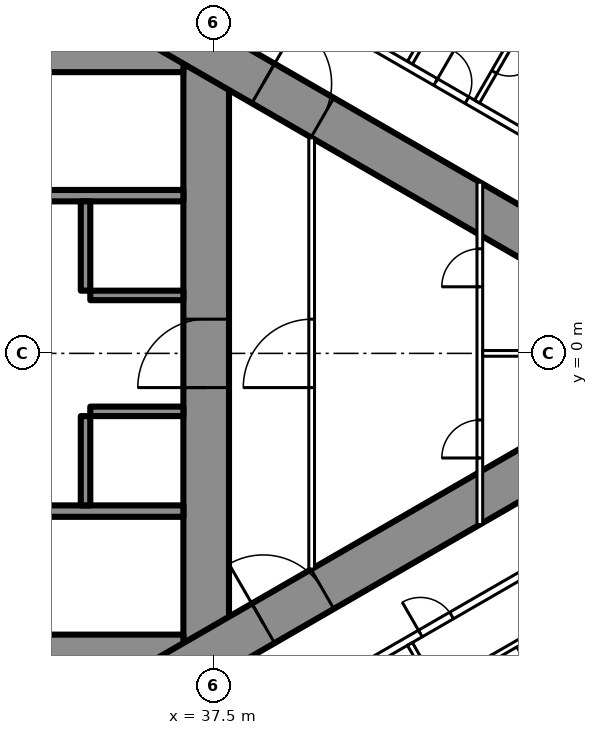
"""IFC4 building model, lengths in metres.
Left out: names, types, materials, properties, quantities, classifications, styles, units other than length and angle.
Written with IfcOpenShell. Run it as: python <this file> out.ifc"""

import sys

from ifc_helpers import new_model, si_unit, direction, frame, frame_2d, origin, place, context, subcontext, project, spatial, rectangle, extrude, element, fill, save


model = new_model("IFC4")
c1 = context("Model", 3, precision=1e-05, world=origin(), true_north=direction((0.0, 1.0)))
c2 = subcontext(c1, "Body", "Model", "MODEL_VIEW")
j1 = project(units=[si_unit("LENGTHUNIT", "METRE"), si_unit("PLANEANGLEUNIT", "RADIAN")], contexts=[c1])
p1 = place(None, origin())
s1 = spatial("IfcSite", under=j1, at=p1, CompositionType="ELEMENT")
p2 = place(p1, origin())
s2 = spatial("IfcBuilding", under=s1, at=p2, CompositionType="ELEMENT")
p3 = place(p2, frame((0.0, 0.0, 218.9)))
s3 = spatial("IfcBuildingStorey", under=s2, at=p3, CompositionType="ELEMENT", Elevation=218.9)
p4 = place(p3, frame((37.3, -8.6, 0.0), z_axis=(0.0, 0.0, 1.0), x_axis=(0.0, 1.0, 0.0)))
e1 = element("IfcWall", 1, at=p4, inside=s3, PredefinedType="SHEAR", context=c2, shape_type="SweptSolid", body=[
    extrude(rectangle(XDim=17.2, YDim=1.2, at=frame_2d((8.6, 0.0))), origin(), (0.0, 0.0, 1.0), 3.6),
])
p5 = place(p4, frame((7.7, 0.0, 0.0)))
e2 = element("IfcOpeningElement", 2, at=p5, cuts=e1, PredefinedType="OPENING", context=c2, shape_type="SweptSolid", body=[
    extrude(rectangle(XDim=1.8, YDim=2.2, at=frame_2d((0.9, 1.1))), frame((0.0, 0.61, 0.0), z_axis=(0.0, -1.0, 0.0), x_axis=(1.0, 0.0, 0.0)), (0.0, 0.0, 1.0), 1.22),
])
p6 = place(p3, frame((28.3, -8.0, 0.0), z_axis=(0.0, 0.0, 1.0), x_axis=(1.0, 0.0, 0.0)))
e3 = element("IfcWall", 3, at=p6, inside=s3, PredefinedType="SHEAR", context=c2, shape_type="SweptSolid", body=[
    extrude(rectangle(XDim=8.4, YDim=1.2, at=frame_2d((4.2, 0.0))), origin(), (0.0, 0.0, 1.0), 3.6),
])
p7 = place(p6, frame((0.25, 0.0, 0.0)))
e4 = element("IfcOpeningElement", 4, at=p7, cuts=e3, PredefinedType="OPENING", context=c2, shape_type="SweptSolid", body=[
    extrude(rectangle(XDim=1.0, YDim=2.2, at=frame_2d((0.5, 1.1))), frame((0.0, 0.61, 0.0), z_axis=(0.0, -1.0, 0.0), x_axis=(1.0, 0.0, 0.0)), (0.0, 0.0, 1.0), 1.22),
])
p8 = place(p3, frame((28.3, 8.0, 0.0), z_axis=(0.0, 0.0, 1.0), x_axis=(1.0, 0.0, 0.0)))
e5 = element("IfcWall", 5, at=p8, inside=s3, PredefinedType="SHEAR", context=c2, shape_type="SweptSolid", body=[
    extrude(rectangle(XDim=8.4, YDim=1.2, at=frame_2d((4.2, 0.0))), origin(), (0.0, 0.0, 1.0), 3.6),
])
p9 = place(p8, frame((0.25, 0.0, 0.0)))
e6 = element("IfcOpeningElement", 6, at=p9, cuts=e5, PredefinedType="OPENING", context=c2, shape_type="SweptSolid", body=[
    extrude(rectangle(XDim=1.0, YDim=2.2, at=frame_2d((0.5, 1.1))), frame((0.0, 0.61, 0.0), z_axis=(0.0, -1.0, 0.0), x_axis=(1.0, 0.0, 0.0)), (0.0, 0.0, 1.0), 1.22),
])
for number, where, z_axis, x_axis in (
    (7, (28.3, -4.15, 0.0), (0.0, 0.0, 1.0), (1.0, 0.0, 0.0)),
    (8, (28.3, 4.15, 0.0), (0.0, 0.0, 1.0), (1.0, 0.0, 0.0)),
):
    element("IfcWall", number, at=place(p3, frame(where, z_axis=z_axis, x_axis=x_axis)), inside=s3, PredefinedType="SHEAR", context=c2, shape_type="SweptSolid", body=[
        extrude(rectangle(XDim=8.4, YDim=0.3, at=frame_2d((4.2, 0.0))), origin(), (0.0, 0.0, 1.0), 3.6),
    ])
p10 = place(p3, frame((34.125, -4.0, 0.0), z_axis=(0.0, 0.0, 1.0), x_axis=(0.0, 1.0, 0.0)))
e9 = element("IfcWall", 9, at=p10, inside=s3, PredefinedType="SHEAR", context=c2, shape_type="SweptSolid", body=[
    extrude(rectangle(XDim=2.35, YDim=0.25, at=frame_2d((1.175, 0.0))), origin(), (0.0, 0.0, 1.0), 3.6),
])
p11 = place(p3, frame((34.25, -1.525, 0.0), z_axis=(0.0, 0.0, 1.0), x_axis=(1.0, 0.0, 0.0)))
e10 = element("IfcWall", 10, at=p11, inside=s3, PredefinedType="SHEAR", context=c2, shape_type="SweptSolid", body=[
    extrude(rectangle(XDim=2.45, YDim=0.25, at=frame_2d((1.225, 0.0))), origin(), (0.0, 0.0, 1.0), 3.6),
])
p12 = place(p3, frame((34.125, 1.65, 0.0), z_axis=(0.0, 0.0, 1.0), x_axis=(0.0, 1.0, 0.0)))
e11 = element("IfcWall", 11, at=p12, inside=s3, PredefinedType="SHEAR", context=c2, shape_type="SweptSolid", body=[
    extrude(rectangle(XDim=2.35, YDim=0.25, at=frame_2d((1.175, 0.0))), origin(), (0.0, 0.0, 1.0), 3.6),
])
p13 = place(p3, frame((34.25, 1.525, 0.0), z_axis=(0.0, 0.0, 1.0), x_axis=(1.0, 0.0, 0.0)))
e12 = element("IfcWall", 12, at=p13, inside=s3, PredefinedType="SHEAR", context=c2, shape_type="SweptSolid", body=[
    extrude(rectangle(XDim=2.45, YDim=0.25, at=frame_2d((1.225, 0.0))), origin(), (0.0, 0.0, 1.0), 3.6),
])
p14 = place(p3, frame((27.2, -13.8, 0.0), z_axis=(0.0, 0.0, 1.0), x_axis=(0.866027159892, 0.499996958321, 0.0)))
e13 = element("IfcWall", 13, at=p14, inside=s3, PredefinedType="SHEAR", context=c2, shape_type="SweptSolid", body=[
    extrude(rectangle(XDim=27.947, YDim=1.2, at=frame_2d((13.973, 0.0))), origin(), (0.0, 0.0, 1.0), 3.6),
])
p15 = place(p14, frame((4.6, 0.0, 0.0)))
e14 = element("IfcOpeningElement", 14, at=p15, cuts=e13, PredefinedType="OPENING", context=c2, shape_type="SweptSolid", body=[
    extrude(rectangle(XDim=1.0, YDim=2.2, at=frame_2d((0.5, 1.1))), frame((0.0, 0.61, 0.0), z_axis=(0.0, -1.0, 0.0), x_axis=(1.0, 0.0, 0.0)), (0.0, 0.0, 1.0), 1.22),
])
p16 = place(p14, frame((13.395, 0.0, 0.0)))
e15 = element("IfcOpeningElement", 15, at=p16, cuts=e13, PredefinedType="OPENING", context=c2, shape_type="SweptSolid", body=[
    extrude(rectangle(XDim=1.8, YDim=2.2, at=frame_2d((0.9, 1.1))), frame((0.0, 0.61, 0.0), z_axis=(0.0, -1.0, 0.0), x_axis=(1.0, 0.0, 0.0)), (0.0, 0.0, 1.0), 1.22),
])
p17 = place(p3, frame((27.2, 13.8, 0.0), z_axis=(0.0, 0.0, 1.0), x_axis=(0.866024515034, -0.500001539357, 0.0)))
e16 = element("IfcWall", 16, at=p17, inside=s3, PredefinedType="SHEAR", context=c2, shape_type="SweptSolid", body=[
    extrude(rectangle(XDim=26.907, YDim=1.2, at=frame_2d((13.454, 0.0))), origin(), (0.0, 0.0, 1.0), 3.6),
])
p18 = place(p17, frame((4.6, 0.0, 0.0)))
e17 = element("IfcOpeningElement", 17, at=p18, cuts=e16, PredefinedType="OPENING", context=c2, shape_type="SweptSolid", body=[
    extrude(rectangle(XDim=1.0, YDim=2.2, at=frame_2d((0.5, 1.1))), frame((0.0, 0.61, 0.0), z_axis=(0.0, -1.0, 0.0), x_axis=(1.0, 0.0, 0.0)), (0.0, 0.0, 1.0), 1.22),
])
p19 = place(p17, frame((13.395, 0.0, 0.0)))
e18 = element("IfcOpeningElement", 18, at=p19, cuts=e16, PredefinedType="OPENING", context=c2, shape_type="SweptSolid", body=[
    extrude(rectangle(XDim=1.8, YDim=2.2, at=frame_2d((0.9, 1.1))), frame((0.0, 0.61, 0.0), z_axis=(0.0, -1.0, 0.0), x_axis=(1.0, 0.0, 0.0)), (0.0, 0.0, 1.0), 1.22),
])
p20 = place(p3, frame((28.959, -15.44, 0.0), z_axis=(0.0, 0.0, 1.0), x_axis=(0.866025227435, 0.500000305447, 0.0)))
e19 = element("IfcWall", 19, at=p20, inside=s3, PredefinedType="PARTITIONING", context=c2, shape_type="SweptSolid", body=[
    extrude(rectangle(XDim=30.88, YDim=0.2, at=frame_2d((15.44, 0.0))), origin(), (0.0, 0.0, 1.0), 3.35),
])
p21 = place(p20, frame((1.494, 0.0, 0.0)))
e20 = element("IfcOpeningElement", 20, at=p21, cuts=e19, PredefinedType="OPENING", context=c2, shape_type="SweptSolid", body=[
    extrude(rectangle(XDim=1.8, YDim=2.03, at=frame_2d((0.9, 1.015))), frame((0.0, 0.11, 0.0), z_axis=(0.0, -1.0, 0.0), x_axis=(1.0, 0.0, 0.0)), (0.0, 0.0, 1.0), 0.22),
])
p22 = place(p20, frame((7.687, 0.0, 0.0)))
e21 = element("IfcOpeningElement", 21, at=p22, cuts=e19, PredefinedType="OPENING", context=c2, shape_type="SweptSolid", body=[
    extrude(rectangle(XDim=1.0, YDim=2.2, at=frame_2d((0.5, 1.1))), frame((0.0, 0.11, 0.0), z_axis=(0.0, -1.0, 0.0), x_axis=(1.0, 0.0, 0.0)), (0.0, 0.0, 1.0), 0.22),
])
p23 = place(p20, frame((16.137, 0.0, 0.0)))
e22 = element("IfcOpeningElement", 22, at=p23, cuts=e19, PredefinedType="OPENING", context=c2, shape_type="SweptSolid", body=[
    extrude(rectangle(XDim=0.95, YDim=2.2, at=frame_2d((0.475, 1.1))), frame((0.0, 0.11, 0.0), z_axis=(0.0, -1.0, 0.0), x_axis=(1.0, 0.0, 0.0)), (0.0, 0.0, 1.0), 0.22),
])
p24 = place(p20, frame((20.021, 0.0, 0.0)))
e23 = element("IfcOpeningElement", 23, at=p24, cuts=e19, PredefinedType="OPENING", context=c2, shape_type="SweptSolid", body=[
    extrude(rectangle(XDim=0.95, YDim=2.2, at=frame_2d((0.475, 1.1))), frame((0.0, 0.11, 0.0), z_axis=(0.0, -1.0, 0.0), x_axis=(1.0, 0.0, 0.0)), (0.0, 0.0, 1.0), 0.22),
])
p25 = place(p20, frame((26.253, 0.0, 0.0)))
e24 = element("IfcOpeningElement", 24, at=p25, cuts=e19, PredefinedType="OPENING", context=c2, shape_type="SweptSolid", body=[
    extrude(rectangle(XDim=0.95, YDim=2.2, at=frame_2d((0.475, 1.1))), frame((0.0, 0.11, 0.0), z_axis=(0.0, -1.0, 0.0), x_axis=(1.0, 0.0, 0.0)), (0.0, 0.0, 1.0), 0.22),
])
for number, where, z_axis, x_axis in (
    (25, (42.66, -7.646, 0.0), (0.0, 0.0, 1.0), (0.5, -0.866, 0.0)),
    (26, (42.66, 7.646, 0.0), (0.0, 0.0, 1.0), (0.5, 0.866, 0.0)),
):
    element("IfcWall", number, at=place(p3, frame(where, z_axis=z_axis, x_axis=x_axis)), inside=s3, PredefinedType="PARTITIONING", context=c2, shape_type="SweptSolid", body=[
        extrude(rectangle(XDim=6.398, YDim=0.15, at=frame_2d((3.199, 0.0))), origin(), (0.0, 0.0, 1.0), 2.45),
    ])
p26 = place(p3, frame((28.959, 15.44, 0.0), z_axis=(0.0, 0.0, 1.0), x_axis=(0.866028936079, -0.499993881836, 0.0)))
e27 = element("IfcWall", 27, at=p26, inside=s3, PredefinedType="PARTITIONING", context=c2, shape_type="SweptSolid", body=[
    extrude(rectangle(XDim=20.503, YDim=0.2, at=frame_2d((10.251, 0.0))), origin(), (0.0, 0.0, 1.0), 3.35),
])
p27 = place(p26, frame((16.603, 0.0, 0.0)))
e28 = element("IfcOpeningElement", 28, at=p27, cuts=e27, PredefinedType="OPENING", context=c2, shape_type="SweptSolid", body=[
    extrude(rectangle(XDim=0.95, YDim=2.2, at=frame_2d((0.475, 1.1))), frame((0.0, 0.11, 0.0), z_axis=(0.0, -1.0, 0.0), x_axis=(1.0, 0.0, 0.0)), (0.0, 0.0, 1.0), 0.22),
])
p28 = place(p26, frame((7.287, 0.0, 0.0)))
e29 = element("IfcOpeningElement", 29, at=p28, cuts=e27, PredefinedType="OPENING", context=c2, shape_type="SweptSolid", body=[
    extrude(rectangle(XDim=0.95, YDim=2.2, at=frame_2d((0.475, 1.1))), frame((0.0, 0.11, 0.0), z_axis=(0.0, -1.0, 0.0), x_axis=(1.0, 0.0, 0.0)), (0.0, 0.0, 1.0), 0.22),
])
p29 = place(p26, frame((2.244, 0.0, 0.0)))
e30 = element("IfcOpeningElement", 30, at=p29, cuts=e27, PredefinedType="OPENING", context=c2, shape_type="SweptSolid", body=[
    extrude(rectangle(XDim=1.8, YDim=2.03, at=frame_2d((0.9, 1.015))), frame((0.0, 0.11, 0.0), z_axis=(0.0, -1.0, 0.0), x_axis=(1.0, 0.0, 0.0)), (0.0, 0.0, 1.0), 0.22),
])
p30 = place(p3, frame((45.503, -7.621, 0.0), z_axis=(0.0, 0.0, 1.0), x_axis=(0.500006934395, -0.866021400173, 0.0)))
e31 = element("IfcWall", 31, at=p30, inside=s3, PredefinedType="PARTITIONING", context=c2, shape_type="SweptSolid", body=[
    extrude(rectangle(XDim=2.6, YDim=0.15, at=frame_2d((1.3, 0.0))), origin(), (0.0, 0.0, 1.0), 3.35),
])
p31 = place(p30, frame((0.9, 0.0, 0.0)))
e32 = element("IfcOpeningElement", 32, at=p31, cuts=e31, PredefinedType="OPENING", context=c2, shape_type="SweptSolid", body=[
    extrude(rectangle(XDim=0.8, YDim=2.2, at=frame_2d((0.4, 1.1))), frame((0.0, 0.085, 0.0), z_axis=(0.0, -1.0, 0.0), x_axis=(1.0, 0.0, 0.0)), (0.0, 0.0, 1.0), 0.17),
])
p32 = place(p3, frame((43.425, -8.821, 0.0), z_axis=(0.0, 0.0, 1.0), x_axis=(0.866006523861, 0.500032699561, 0.0)))
e33 = element("IfcWall", 33, at=p32, inside=s3, PredefinedType="PARTITIONING", context=c2, shape_type="SweptSolid", body=[
    extrude(rectangle(XDim=2.475, YDim=0.15, at=frame_2d((1.237, 0.0))), origin(), (0.0, 0.0, 1.0), 3.35),
])
p33 = place(p3, frame((44.427, 6.625, 0.0), z_axis=(0.0, 0.0, 1.0), x_axis=(0.500006934395, 0.866021400173, 0.0)))
e34 = element("IfcWall", 34, at=p33, inside=s3, PredefinedType="PARTITIONING", context=c2, shape_type="SweptSolid", body=[
    extrude(rectangle(XDim=2.6, YDim=0.15, at=frame_2d((1.3, 0.0))), origin(), (0.0, 0.0, 1.0), 3.35),
])
p34 = place(p33, frame((0.9, 0.0, 0.0)))
e35 = element("IfcOpeningElement", 35, at=p34, cuts=e34, PredefinedType="OPENING", context=c2, shape_type="SweptSolid", body=[
    extrude(rectangle(XDim=0.8, YDim=2.2, at=frame_2d((0.4, 1.1))), frame((0.0, 0.085, 0.0), z_axis=(0.0, -1.0, 0.0), x_axis=(1.0, 0.0, 0.0)), (0.0, 0.0, 1.0), 0.17),
])
p35 = place(p3, frame((40.075, -5.674, 0.0), z_axis=(0.0, 0.0, 1.0), x_axis=(0.0, 1.0, 0.0)))
e36 = element("IfcWall", 36, at=p35, inside=s3, PredefinedType="PARTITIONING", context=c2, shape_type="SweptSolid", body=[
    extrude(rectangle(XDim=11.348, YDim=0.15, at=frame_2d((5.674, 0.0))), origin(), (0.0, 0.0, 1.0), 3.35),
])
p36 = place(p35, frame((4.774, 0.0, 0.0)))
e37 = element("IfcOpeningElement", 37, at=p36, cuts=e36, PredefinedType="OPENING", context=c2, shape_type="SweptSolid", body=[
    extrude(rectangle(XDim=1.8, YDim=2.2, at=frame_2d((0.9, 1.1))), frame((0.0, 0.085, 0.0), z_axis=(0.0, -1.0, 0.0), x_axis=(1.0, 0.0, 0.0)), (0.0, 0.0, 1.0), 0.17),
])
p37 = place(p3, frame((44.5, -4.505, 0.0), z_axis=(0.0, 0.0, 1.0), x_axis=(0.0, 1.0, 0.0)))
e38 = element("IfcWall", 38, at=p37, inside=s3, PredefinedType="PARTITIONING", context=c2, shape_type="SweptSolid", body=[
    extrude(rectangle(XDim=9.009, YDim=0.15, at=frame_2d((4.505, 0.0))), origin(), (0.0, 0.0, 1.0), 3.35),
])
p38 = place(p37, frame((1.752, 0.0, 0.0)))
e39 = element("IfcOpeningElement", 39, at=p38, cuts=e38, PredefinedType="OPENING", context=c2, shape_type="SweptSolid", body=[
    extrude(rectangle(XDim=1.0, YDim=2.2, at=frame_2d((0.5, 1.1))), frame((0.0, 0.085, 0.0), z_axis=(0.0, -1.0, 0.0), x_axis=(1.0, 0.0, 0.0)), (0.0, 0.0, 1.0), 0.17),
])
p39 = place(p37, frame((6.257, 0.0, 0.0)))
e40 = element("IfcOpeningElement", 40, at=p39, cuts=e38, PredefinedType="OPENING", context=c2, shape_type="SweptSolid", body=[
    extrude(rectangle(XDim=1.0, YDim=2.2, at=frame_2d((0.5, 1.1))), frame((0.0, 0.085, 0.0), z_axis=(0.0, -1.0, 0.0), x_axis=(1.0, 0.0, 0.0)), (0.0, 0.0, 1.0), 0.17),
])
p40 = place(p3, frame((44.575, 0.0, 0.0), z_axis=(0.0, 0.0, 1.0), x_axis=(1.0, 0.0, 0.0)))
e41 = element("IfcWall", 41, at=p40, inside=s3, PredefinedType="PARTITIONING", context=c2, shape_type="SweptSolid", body=[
    extrude(rectangle(XDim=7.727, YDim=0.15, at=frame_2d((3.864, 0.0))), origin(), (0.0, 0.0, 1.0), 2.45),
])
p41 = place(p23, origin())
e42 = element("IfcDoor", 42, at=p41, inside=s3, OperationType="SINGLE_SWING_LEFT", PredefinedType="DOOR", context=c2, shape_type="SweptSolid", body=[
    extrude(rectangle(XDim=0.95, YDim=2.2, at=frame_2d((0.475, 1.1))), frame((0.0, 0.025, 0.0), z_axis=(0.0, -1.0, 0.0), x_axis=(1.0, 0.0, 0.0)), (0.0, 0.0, 1.0), 0.05),
])
fill(e22, e42)
p42 = place(p34, origin())
e43 = element("IfcDoor", 43, at=p42, inside=s3, OperationType="SINGLE_SWING_RIGHT", PredefinedType="DOOR", context=c2, shape_type="SweptSolid", body=[
    extrude(rectangle(XDim=0.8, YDim=2.2, at=frame_2d((0.4, 1.1))), frame((0.0, 0.025, 0.0), z_axis=(0.0, -1.0, 0.0), x_axis=(1.0, 0.0, 0.0)), (0.0, 0.0, 1.0), 0.05),
])
fill(e35, e43)
p43 = place(p27, origin())
e44 = element("IfcDoor", 44, at=p43, inside=s3, OperationType="SINGLE_SWING_LEFT", PredefinedType="DOOR", context=c2, shape_type="SweptSolid", body=[
    extrude(rectangle(XDim=0.95, YDim=2.2, at=frame_2d((0.475, 1.1))), frame((0.0, 0.025, 0.0), z_axis=(0.0, -1.0, 0.0), x_axis=(1.0, 0.0, 0.0)), (0.0, 0.0, 1.0), 0.05),
])
fill(e28, e44)
p44 = place(p36, origin())
e45 = element("IfcDoor", 45, at=p44, inside=s3, OperationType="DOUBLE_DOOR_SINGLE_SWING", PredefinedType="DOOR", context=c2, shape_type="SweptSolid", body=[
    extrude(rectangle(XDim=1.8, YDim=2.2, at=frame_2d((0.9, 1.1))), frame((0.0, 0.025, 0.0), z_axis=(0.0, -1.0, 0.0), x_axis=(1.0, 0.0, 0.0)), (0.0, 0.0, 1.0), 0.05),
])
fill(e37, e45)
p45 = place(p38, origin())
e46 = element("IfcDoor", 46, at=p45, inside=s3, OperationType="SINGLE_SWING_LEFT", PredefinedType="DOOR", context=c2, shape_type="SweptSolid", body=[
    extrude(rectangle(XDim=1.0, YDim=2.2, at=frame_2d((0.5, 1.1))), frame((0.0, 0.025, 0.0), z_axis=(0.0, -1.0, 0.0), x_axis=(1.0, 0.0, 0.0)), (0.0, 0.0, 1.0), 0.05),
])
fill(e39, e46)
p46 = place(p39, origin())
e47 = element("IfcDoor", 47, at=p46, inside=s3, OperationType="SINGLE_SWING_LEFT", PredefinedType="DOOR", context=c2, shape_type="SweptSolid", body=[
    extrude(rectangle(XDim=1.0, YDim=2.2, at=frame_2d((0.5, 1.1))), frame((0.0, 0.025, 0.0), z_axis=(0.0, -1.0, 0.0), x_axis=(1.0, 0.0, 0.0)), (0.0, 0.0, 1.0), 0.05),
])
fill(e40, e47)
p47 = place(p16, origin())
e48 = element("IfcDoor", 48, at=p47, inside=s3, OperationType="DOUBLE_DOOR_SINGLE_SWING", PredefinedType="DOOR", context=c2, shape_type="SweptSolid", body=[
    extrude(rectangle(XDim=1.8, YDim=2.2, at=frame_2d((0.9, 1.1))), frame((0.0, 0.025, 0.0), z_axis=(0.0, -1.0, 0.0), x_axis=(1.0, 0.0, 0.0)), (0.0, 0.0, 1.0), 0.05),
])
fill(e15, e48)
p48 = place(p19, origin())
e49 = element("IfcDoor", 49, at=p48, inside=s3, OperationType="DOUBLE_DOOR_SINGLE_SWING", PredefinedType="DOOR", context=c2, shape_type="SweptSolid", body=[
    extrude(rectangle(XDim=1.8, YDim=2.2, at=frame_2d((0.9, 1.1))), frame((0.0, 0.025, 0.0), z_axis=(0.0, -1.0, 0.0), x_axis=(1.0, 0.0, 0.0)), (0.0, 0.0, 1.0), 0.05),
])
fill(e18, e49)
p49 = place(p5, origin())
e50 = element("IfcDoor", 50, at=p49, inside=s3, OperationType="DOUBLE_DOOR_SINGLE_SWING", PredefinedType="DOOR", context=c2, shape_type="SweptSolid", body=[
    extrude(rectangle(XDim=1.8, YDim=2.2, at=frame_2d((0.9, 1.1))), frame((0.0, 0.025, 0.0), z_axis=(0.0, -1.0, 0.0), x_axis=(1.0, 0.0, 0.0)), (0.0, 0.0, 1.0), 0.05),
])
fill(e2, e50)
save(model, sys.argv[1])
